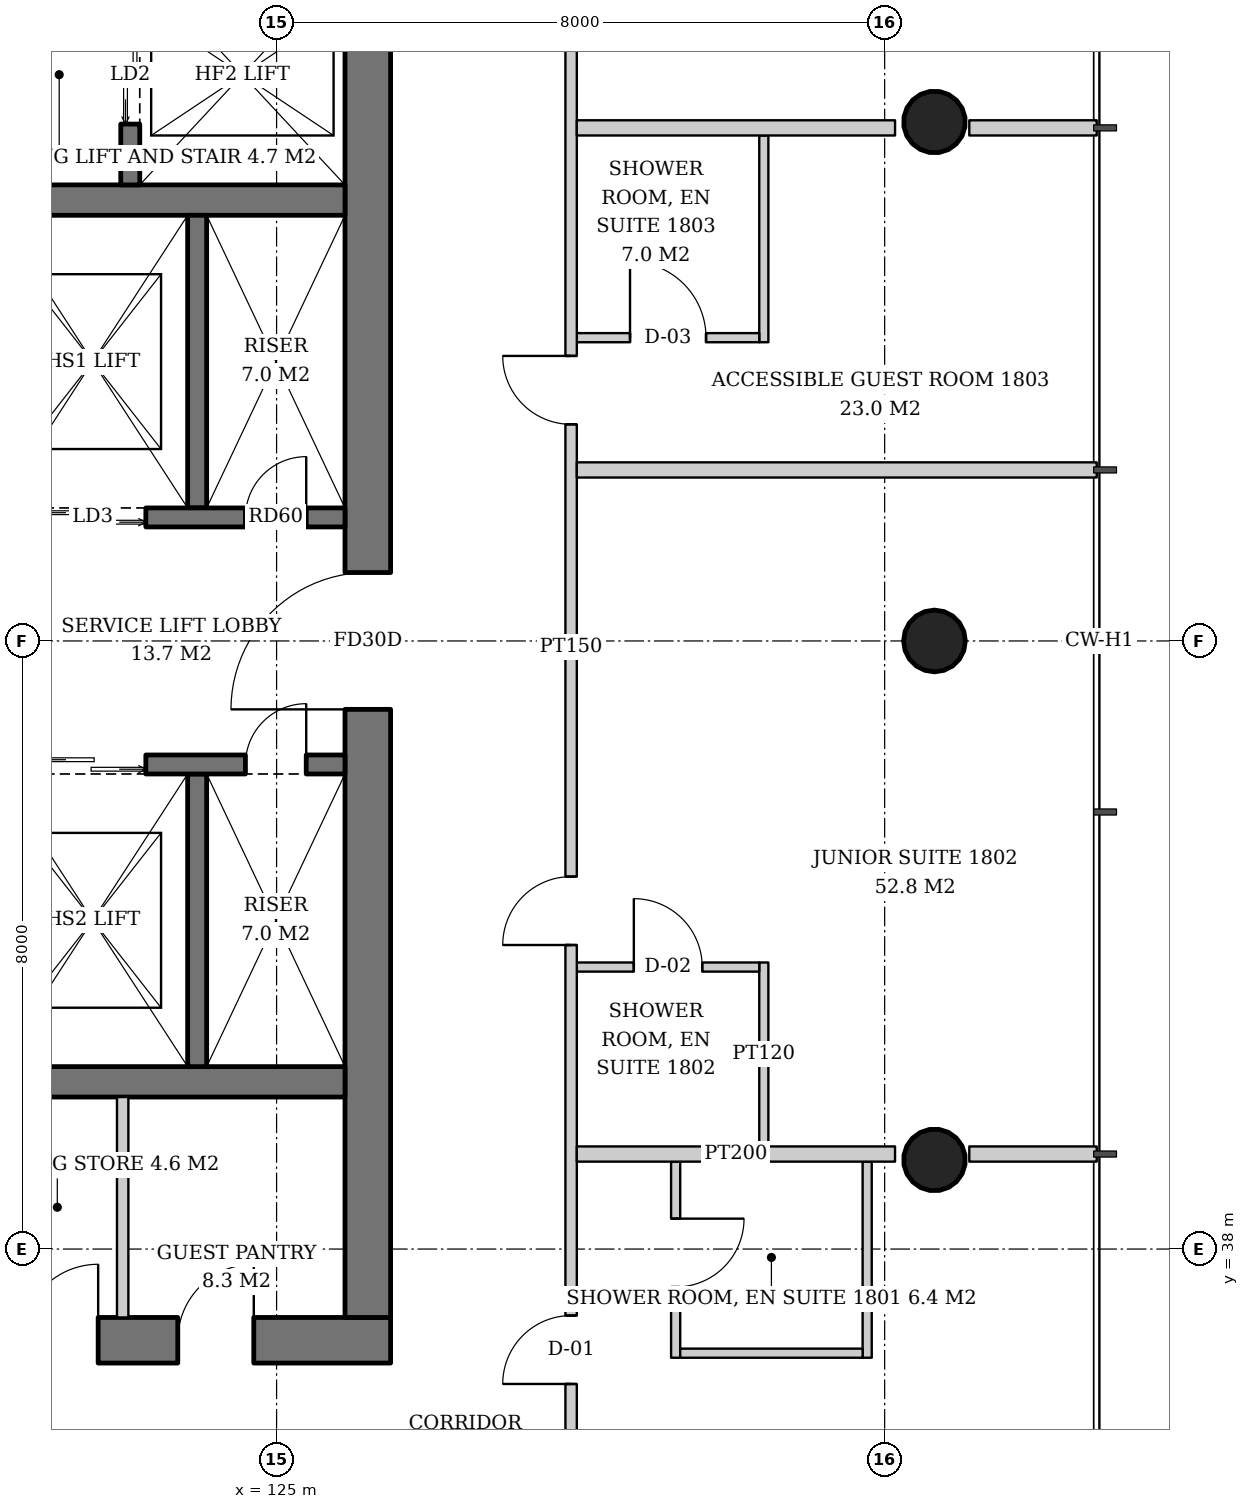
"""IFC4 building model, lengths in metres.
Left out: names, types, materials, properties, quantities, classifications, styles, units other than length and angle.
Written with IfcOpenShell. Run it as: python <this file> out.ifc"""

import sys

from ifc_helpers import new_model, si_unit, direction, frame, frame_2d, origin, origin_2d, place, context, subcontext, project, spatial, rectangle, hollow_circle, extrude, element, fill, save


model = new_model("IFC4")
c1 = context("Model", 3, precision=1e-05, world=origin(), true_north=direction((0.0, 1.0)))
c2 = subcontext(c1, "Body", "Model", "MODEL_VIEW")
j1 = project(units=[si_unit("LENGTHUNIT", "METRE"), si_unit("PLANEANGLEUNIT", "RADIAN")], contexts=[c1])
p1 = place(None, origin())
s1 = spatial("IfcSite", under=j1, at=p1, CompositionType="ELEMENT")
p2 = place(p1, origin())
s2 = spatial("IfcBuilding", under=s1, at=p2, CompositionType="ELEMENT")
p3 = place(p2, frame((0.0, 0.0, 74.2)))
s3 = spatial("IfcBuildingStorey", under=s2, at=p3, CompositionType="ELEMENT", Elevation=74.2)
p4 = place(p3, frame((133.707, 39.146, 0.0), z_axis=(-0.042995471882, 0.021561908287, 0.998842566929), x_axis=(-0.448280611873, -0.89389288677, 0.0)))
e1 = element("IfcColumn", 1, at=p4, inside=s3, PredefinedType="COLUMN", context=c2, shape_type="SweptSolid", body=[
    extrude(hollow_circle(Radius=0.406, WallThickness=0.03, at=origin_2d()), origin(), (0.0, 0.0, 1.0), 3.804),
])
p5 = place(p3, frame((133.707, 46.0, 0.0), z_axis=(-0.043005470007, 0.0, 0.999074836811), x_axis=(0.0, -1.0, 0.0)))
e2 = element("IfcColumn", 2, at=p5, inside=s3, PredefinedType="COLUMN", context=c2, shape_type="SweptSolid", body=[
    extrude(hollow_circle(Radius=0.406, WallThickness=0.03, at=origin_2d()), origin(), (0.0, 0.0, 1.0), 3.803),
])
p6 = place(p3, frame((133.707, 52.854, 0.0), z_axis=(-0.042995471882, -0.021561908287, 0.998842566929), x_axis=(0.448280611873, -0.89389288677, 0.0)))
e3 = element("IfcColumn", 3, at=p6, inside=s3, PredefinedType="COLUMN", context=c2, shape_type="SweptSolid", body=[
    extrude(hollow_circle(Radius=0.406, WallThickness=0.03, at=origin_2d()), origin(), (0.0, 0.0, 1.0), 3.804),
])
p7 = place(p3, frame((107.5, 36.8, 0.0), z_axis=(0.0, 0.0, 1.0), x_axis=(1.0, 0.0, 0.0)))
e4 = element("IfcWall", 4, at=p7, inside=s3, PredefinedType="SHEAR", context=c2, shape_type="SweptSolid", body=[
    extrude(rectangle(XDim=19.0, YDim=0.6, at=frame_2d((9.5, 0.0))), origin(), (0.0, 0.0, 1.0), 3.8),
])
p8 = place(p7, frame((3.9, 0.0, 0.0)))
e5 = element("IfcOpeningElement", 5, at=p8, cuts=e4, PredefinedType="OPENING", context=c2, shape_type="SweptSolid", body=[
    extrude(rectangle(XDim=1.0, YDim=2.1, at=frame_2d((0.5, 1.05))), frame((0.0, 0.31, 0.0), z_axis=(0.0, -1.0, 0.0), x_axis=(1.0, 0.0, 0.0)), (0.0, 0.0, 1.0), 0.62),
])
p9 = place(p7, frame((14.153, 0.0, 0.0)))
e6 = element("IfcOpeningElement", 6, at=p9, cuts=e4, PredefinedType="OPENING", context=c2, shape_type="SweptSolid", body=[
    extrude(rectangle(XDim=1.0, YDim=2.1, at=frame_2d((0.5, 1.05))), frame((0.0, 0.31, 0.0), z_axis=(0.0, -1.0, 0.0), x_axis=(1.0, 0.0, 0.0)), (0.0, 0.0, 1.0), 0.62),
])
p10 = place(p7, frame((16.2, 0.0, 0.0)))
e7 = element("IfcOpeningElement", 7, at=p10, cuts=e4, PredefinedType="OPENING", context=c2, shape_type="SweptSolid", body=[
    extrude(rectangle(XDim=1.0, YDim=2.1, at=frame_2d((0.5, 1.05))), frame((0.0, 0.31, 0.0), z_axis=(0.0, -1.0, 0.0), x_axis=(1.0, 0.0, 0.0)), (0.0, 0.0, 1.0), 0.62),
])
p11 = place(p3, frame((126.2, 37.1, 0.0), z_axis=(0.0, 0.0, 1.0), x_axis=(0.0, 1.0, 0.0)))
e8 = element("IfcWall", 8, at=p11, inside=s3, PredefinedType="SHEAR", context=c2, shape_type="SweptSolid", body=[
    extrude(rectangle(XDim=17.8, YDim=0.6, at=frame_2d((8.9, 0.0))), origin(), (0.0, 0.0, 1.0), 3.8),
])
p12 = place(p11, frame((8.0, 0.0, 0.0)))
e9 = element("IfcOpeningElement", 9, at=p12, cuts=e8, PredefinedType="OPENING", context=c2, shape_type="SweptSolid", body=[
    extrude(rectangle(XDim=1.8, YDim=2.4, at=frame_2d((0.9, 1.2))), frame((0.0, 0.31, 0.0), z_axis=(0.0, -1.0, 0.0), x_axis=(1.0, 0.0, 0.0)), (0.0, 0.0, 1.0), 0.62),
])
for number, where, z_axis, x_axis in (
    (10, (108.1, 40.2, 0.0), (0.0, 0.0, 1.0), (1.0, 0.0, 0.0)),
    (11, (108.1, 51.8, 0.0), (0.0, 0.0, 1.0), (1.0, 0.0, 0.0)),
):
    element("IfcWall", number, at=place(p3, frame(where, z_axis=z_axis, x_axis=x_axis)), inside=s3, PredefinedType="SHEAR", context=c2, shape_type="SweptSolid", body=[
        extrude(rectangle(XDim=17.8, YDim=0.4, at=frame_2d((8.9, 0.0))), origin(), (0.0, 0.0, 1.0), 3.8),
    ])
p13 = place(p3, frame((123.075, 52.0, 0.0), z_axis=(0.0, 0.0, 1.0), x_axis=(0.0, 1.0, 0.0)))
e12 = element("IfcWall", 12, at=p13, inside=s3, PredefinedType="SHEAR", context=c2, shape_type="SweptSolid", body=[
    extrude(rectangle(XDim=2.9, YDim=0.25, at=frame_2d((1.45, 0.0))), origin(), (0.0, 0.0, 1.0), 3.8),
])
p14 = place(p13, frame((0.8, 0.0, 0.0)))
e13 = element("IfcOpeningElement", 13, at=p14, cuts=e12, PredefinedType="OPENING", context=c2, shape_type="SweptSolid", body=[
    extrude(rectangle(XDim=1.3, YDim=2.2, at=frame_2d((0.65, 1.1))), frame((0.0, 0.135, 0.0), z_axis=(0.0, -1.0, 0.0), x_axis=(1.0, 0.0, 0.0)), (0.0, 0.0, 1.0), 0.27),
])
p15 = place(p3, frame((123.955, 47.75, 0.0), z_axis=(0.0, 0.0, 1.0), x_axis=(0.0, 1.0, 0.0)))
e14 = element("IfcWall", 14, at=p15, inside=s3, PredefinedType="SHEAR", context=c2, shape_type="SweptSolid", body=[
    extrude(rectangle(XDim=3.85, YDim=0.25, at=frame_2d((1.925, 0.0))), origin(), (0.0, 0.0, 1.0), 3.8),
])
p16 = place(p3, frame((121.33, 47.625, 0.0), z_axis=(0.0, 0.0, 1.0), x_axis=(1.0, 0.0, 0.0)))
e15 = element("IfcWall", 15, at=p16, inside=s3, PredefinedType="SHEAR", context=c2, shape_type="SweptSolid", body=[
    extrude(rectangle(XDim=4.57, YDim=0.25, at=frame_2d((2.285, 0.0))), origin(), (0.0, 0.0, 1.0), 3.8),
])
p17 = place(p16, frame((0.55, 0.0, 0.0)))
e16 = element("IfcOpeningElement", 16, at=p17, cuts=e15, PredefinedType="OPENING", context=c2, shape_type="SweptSolid", body=[
    extrude(rectangle(XDim=1.4, YDim=2.4, at=frame_2d((0.7, 1.2))), frame((0.0, 0.135, 0.0), z_axis=(0.0, -1.0, 0.0), x_axis=(1.0, 0.0, 0.0)), (0.0, 0.0, 1.0), 0.27),
])
p18 = place(p16, frame((3.26, 0.0, 0.0)))
e17 = element("IfcOpeningElement", 17, at=p18, cuts=e15, PredefinedType="OPENING", context=c2, shape_type="SweptSolid", body=[
    extrude(rectangle(XDim=0.8, YDim=2.0, at=frame_2d((0.4, 1.0))), frame((0.0, 0.135, 0.0), z_axis=(0.0, -1.0, 0.0), x_axis=(1.0, 0.0, 0.0)), (0.0, 0.0, 1.0), 0.27),
])
p19 = place(p3, frame((123.955, 44.25, 0.0), z_axis=(0.0, 0.0, 1.0), x_axis=(0.0, -1.0, 0.0)))
e18 = element("IfcWall", 18, at=p19, inside=s3, PredefinedType="SHEAR", context=c2, shape_type="SweptSolid", body=[
    extrude(rectangle(XDim=3.85, YDim=0.25, at=frame_2d((1.925, 0.0))), origin(), (0.0, 0.0, 1.0), 3.8),
])
p20 = place(p3, frame((121.33, 44.375, 0.0), z_axis=(0.0, 0.0, 1.0), x_axis=(1.0, 0.0, 0.0)))
e19 = element("IfcWall", 19, at=p20, inside=s3, PredefinedType="SHEAR", context=c2, shape_type="SweptSolid", body=[
    extrude(rectangle(XDim=4.57, YDim=0.25, at=frame_2d((2.285, 0.0))), origin(), (0.0, 0.0, 1.0), 3.8),
])
p21 = place(p20, frame((0.55, 0.0, 0.0)))
e20 = element("IfcOpeningElement", 20, at=p21, cuts=e19, PredefinedType="OPENING", context=c2, shape_type="SweptSolid", body=[
    extrude(rectangle(XDim=1.4, YDim=2.4, at=frame_2d((0.7, 1.2))), frame((0.0, 0.135, 0.0), z_axis=(0.0, -1.0, 0.0), x_axis=(1.0, 0.0, 0.0)), (0.0, 0.0, 1.0), 0.27),
])
p22 = place(p20, frame((3.26, 0.0, 0.0)))
e21 = element("IfcOpeningElement", 21, at=p22, cuts=e19, PredefinedType="OPENING", context=c2, shape_type="SweptSolid", body=[
    extrude(rectangle(XDim=0.8, YDim=2.0, at=frame_2d((0.4, 1.0))), frame((0.0, 0.135, 0.0), z_axis=(0.0, -1.0, 0.0), x_axis=(1.0, 0.0, 0.0)), (0.0, 0.0, 1.0), 0.27),
])
p23 = place(p3, frame((122.975, 37.1, 0.0), z_axis=(0.0, 0.0, 1.0), x_axis=(0.0, 1.0, 0.0)))
e22 = element("IfcWall", 22, at=p23, inside=s3, PredefinedType="SOLIDWALL", context=c2, shape_type="SweptSolid", body=[
    extrude(rectangle(XDim=2.9, YDim=0.15, at=frame_2d((1.45, 0.0))), origin(), (0.0, 0.0, 1.0), 3.6),
])
p24 = place(p3, frame((130.25, 39.15, 0.0), z_axis=(0.0, 0.0, 1.0), x_axis=(0.0, -1.0, 0.0)))
e23 = element("IfcWall", 23, at=p24, inside=s3, PredefinedType="PARTITIONING", context=c2, shape_type="SweptSolid", body=[
    extrude(rectangle(XDim=2.58, YDim=0.12, at=frame_2d((1.29, 0.0))), origin(), (0.0, 0.0, 1.0), 2.8),
])
p25 = place(p24, frame((0.75, 0.0, 0.0)))
e24 = element("IfcOpeningElement", 24, at=p25, cuts=e23, PredefinedType="OPENING", context=c2, shape_type="SweptSolid", body=[
    extrude(rectangle(XDim=0.9, YDim=2.1, at=frame_2d((0.45, 1.05))), frame((0.0, 0.07, 0.0), z_axis=(0.0, -1.0, 0.0), x_axis=(1.0, 0.0, 0.0)), (0.0, 0.0, 1.0), 0.14),
])
p26 = place(p3, frame((132.77, 39.15, 0.0), z_axis=(0.0, 0.0, 1.0), x_axis=(0.0, -1.0, 0.0)))
e25 = element("IfcWall", 25, at=p26, inside=s3, PredefinedType="PARTITIONING", context=c2, shape_type="SweptSolid", body=[
    extrude(rectangle(XDim=2.58, YDim=0.12, at=frame_2d((1.29, 0.0))), origin(), (0.0, 0.0, 1.0), 2.8),
])
p27 = place(p3, frame((130.31, 36.63, 0.0), z_axis=(0.0, 0.0, 1.0), x_axis=(1.0, 0.0, 0.0)))
e26 = element("IfcWall", 26, at=p27, inside=s3, PredefinedType="PARTITIONING", context=c2, shape_type="SweptSolid", body=[
    extrude(rectangle(XDim=2.4, YDim=0.12, at=frame_2d((1.2, 0.0))), origin(), (0.0, 0.0, 1.0), 2.8),
])
p28 = place(p3, frame((131.41, 39.35, 0.0), z_axis=(0.0, 0.0, 1.0), x_axis=(0.0, 1.0, 0.0)))
e27 = element("IfcWall", 27, at=p28, inside=s3, PredefinedType="PARTITIONING", context=c2, shape_type="SweptSolid", body=[
    extrude(rectangle(XDim=2.42, YDim=0.12, at=frame_2d((1.21, 0.0))), origin(), (0.0, 0.0, 1.0), 2.847),
])
p29 = place(p3, frame((128.95, 41.71, 0.0), z_axis=(0.0, 0.0, 1.0), x_axis=(1.0, 0.0, 0.0)))
e28 = element("IfcWall", 28, at=p29, inside=s3, PredefinedType="PARTITIONING", context=c2, shape_type="SweptSolid", body=[
    extrude(rectangle(XDim=2.4, YDim=0.12, at=frame_2d((1.2, 0.0))), origin(), (0.0, 0.0, 1.0), 3.6),
])
p30 = place(p29, frame((0.75, 0.0, 0.0)))
e29 = element("IfcOpeningElement", 29, at=p30, cuts=e28, PredefinedType="OPENING", context=c2, shape_type="SweptSolid", body=[
    extrude(rectangle(XDim=0.9, YDim=2.1, at=frame_2d((0.45, 1.05))), frame((0.0, 0.07, 0.0), z_axis=(0.0, -1.0, 0.0), x_axis=(1.0, 0.0, 0.0)), (0.0, 0.0, 1.0), 0.14),
])
p31 = place(p3, frame((131.41, 49.93, 0.0), z_axis=(0.0, 0.0, 1.0), x_axis=(0.0, 1.0, 0.0)))
e30 = element("IfcWall", 30, at=p31, inside=s3, PredefinedType="PARTITIONING", context=c2, shape_type="SweptSolid", body=[
    extrude(rectangle(XDim=2.72, YDim=0.12, at=frame_2d((1.36, 0.0))), origin(), (0.0, 0.0, 1.0), 3.6),
])
p32 = place(p3, frame((128.95, 49.99, 0.0), z_axis=(0.0, 0.0, 1.0), x_axis=(1.0, 0.0, 0.0)))
e31 = element("IfcWall", 31, at=p32, inside=s3, PredefinedType="PARTITIONING", context=c2, shape_type="SweptSolid", body=[
    extrude(rectangle(XDim=2.4, YDim=0.12, at=frame_2d((1.2, 0.0))), origin(), (0.0, 0.0, 1.0), 3.6),
])
p33 = place(p32, frame((0.7, 0.0, 0.0)))
e32 = element("IfcOpeningElement", 32, at=p33, cuts=e31, PredefinedType="OPENING", context=c2, shape_type="SweptSolid", body=[
    extrude(rectangle(XDim=1.0, YDim=2.1, at=frame_2d((0.5, 1.05))), frame((0.0, 0.07, 0.0), z_axis=(0.0, -1.0, 0.0), x_axis=(1.0, 0.0, 0.0)), (0.0, 0.0, 1.0), 0.14),
])
p34 = place(p3, frame((128.875, 34.05, 0.0), z_axis=(0.0, 0.0, 1.0), x_axis=(0.0, 1.0, 0.0)))
e33 = element("IfcWall", 33, at=p34, inside=s3, PredefinedType="PARTITIONING", context=c2, shape_type="SweptSolid", body=[
    extrude(rectangle(XDim=23.75, YDim=0.15, at=frame_2d((11.875, 0.0))), origin(), (0.0, 0.0, 1.0), 2.8),
])
p35 = place(p34, frame((2.175, 0.0, 0.0)))
e34 = element("IfcOpeningElement", 34, at=p35, cuts=e33, PredefinedType="OPENING", context=c2, shape_type="SweptSolid", body=[
    extrude(rectangle(XDim=0.9, YDim=2.1, at=frame_2d((0.45, 1.05))), frame((0.0, 0.085, 0.0), z_axis=(0.0, -1.0, 0.0), x_axis=(1.0, 0.0, 0.0)), (0.0, 0.0, 1.0), 0.17),
])
p36 = place(p34, frame((7.95, 0.0, 0.0)))
e35 = element("IfcOpeningElement", 35, at=p36, cuts=e33, PredefinedType="OPENING", context=c2, shape_type="SweptSolid", body=[
    extrude(rectangle(XDim=0.9, YDim=2.1, at=frame_2d((0.45, 1.05))), frame((0.0, 0.085, 0.0), z_axis=(0.0, -1.0, 0.0), x_axis=(1.0, 0.0, 0.0)), (0.0, 0.0, 1.0), 0.17),
])
p37 = place(p34, frame((14.8, 0.0, 0.0)))
e36 = element("IfcOpeningElement", 36, at=p37, cuts=e33, PredefinedType="OPENING", context=c2, shape_type="SweptSolid", body=[
    extrude(rectangle(XDim=0.9, YDim=2.1, at=frame_2d((0.45, 1.05))), frame((0.0, 0.085, 0.0), z_axis=(0.0, -1.0, 0.0), x_axis=(1.0, 0.0, 0.0)), (0.0, 0.0, 1.0), 0.17),
])
p38 = place(p3, frame((128.95, 39.25, 0.0), z_axis=(0.0, 0.0, 1.0), x_axis=(1.0, 0.0, 0.0)))
e37 = element("IfcWall", 37, at=p38, inside=s3, PredefinedType="PARTITIONING", context=c2, shape_type="SweptSolid", body=[
    extrude(rectangle(XDim=4.187, YDim=0.2, at=frame_2d((2.093, 0.0))), origin(), (0.0, 0.0, 1.0), 3.6),
])
p39 = place(p3, frame((134.113, 39.25, 0.0), z_axis=(0.0, 0.0, 1.0), x_axis=(1.0, 0.0, 0.0)))
e38 = element("IfcWall", 38, at=p39, inside=s3, PredefinedType="PARTITIONING", context=c2, shape_type="SweptSolid", body=[
    extrude(rectangle(XDim=1.677, YDim=0.2, at=frame_2d((0.838, 0.0))), origin(), (0.0, 0.0, 1.0), 3.6),
])
p40 = place(p3, frame((128.95, 48.25, 0.0), z_axis=(0.0, 0.0, 1.0), x_axis=(1.0, 0.0, 0.0)))
e39 = element("IfcWall", 39, at=p40, inside=s3, PredefinedType="PARTITIONING", context=c2, shape_type="SweptSolid", body=[
    extrude(rectangle(XDim=6.84, YDim=0.2, at=frame_2d((3.42, 0.0))), origin(), (0.0, 0.0, 1.0), 3.05),
])
p41 = place(p3, frame((128.95, 52.75, 0.0), z_axis=(0.0, 0.0, 1.0), x_axis=(1.0, 0.0, 0.0)))
e40 = element("IfcWall", 40, at=p41, inside=s3, PredefinedType="PARTITIONING", context=c2, shape_type="SweptSolid", body=[
    extrude(rectangle(XDim=4.187, YDim=0.2, at=frame_2d((2.093, 0.0))), origin(), (0.0, 0.0, 1.0), 3.6),
])
p42 = place(p3, frame((134.113, 52.75, 0.0), z_axis=(0.0, 0.0, 1.0), x_axis=(1.0, 0.0, 0.0)))
e41 = element("IfcWall", 41, at=p42, inside=s3, PredefinedType="PARTITIONING", context=c2, shape_type="SweptSolid", body=[
    extrude(rectangle(XDim=1.677, YDim=0.2, at=frame_2d((0.838, 0.0))), origin(), (0.0, 0.0, 1.0), 3.6),
])
p43 = place(p14, origin())
e42 = element("IfcDoor", 42, at=p43, inside=s3, OperationType="DOUBLE_DOOR_SLIDING", PredefinedType="DOOR", context=c2, shape_type="SweptSolid", body=[
    extrude(rectangle(XDim=1.3, YDim=2.2, at=frame_2d((0.65, 1.1))), frame((0.0, 0.025, 0.0), z_axis=(0.0, -1.0, 0.0), x_axis=(1.0, 0.0, 0.0)), (0.0, 0.0, 1.0), 0.05),
])
fill(e13, e42)
p44 = place(p17, origin())
e43 = element("IfcDoor", 43, at=p44, inside=s3, OperationType="DOUBLE_DOOR_SLIDING", PredefinedType="DOOR", context=c2, shape_type="SweptSolid", body=[
    extrude(rectangle(XDim=1.4, YDim=2.4, at=frame_2d((0.7, 1.2))), frame((0.0, 0.025, 0.0), z_axis=(0.0, -1.0, 0.0), x_axis=(1.0, 0.0, 0.0)), (0.0, 0.0, 1.0), 0.05),
])
fill(e16, e43)
p45 = place(p18, origin())
e44 = element("IfcDoor", 44, at=p45, inside=s3, OperationType="SINGLE_SWING_RIGHT", PredefinedType="DOOR", context=c2, shape_type="SweptSolid", body=[
    extrude(rectangle(XDim=0.8, YDim=2.0, at=frame_2d((0.4, 1.0))), frame((0.0, 0.025, 0.0), z_axis=(0.0, -1.0, 0.0), x_axis=(1.0, 0.0, 0.0)), (0.0, 0.0, 1.0), 0.05),
])
fill(e17, e44)
p46 = place(p21, origin())
e45 = element("IfcDoor", 45, at=p46, inside=s3, OperationType="DOUBLE_DOOR_SLIDING", PredefinedType="DOOR", context=c2, shape_type="SweptSolid", body=[
    extrude(rectangle(XDim=1.4, YDim=2.4, at=frame_2d((0.7, 1.2))), frame((0.0, 0.025, 0.0), z_axis=(0.0, -1.0, 0.0), x_axis=(1.0, 0.0, 0.0)), (0.0, 0.0, 1.0), 0.05),
])
fill(e20, e45)
p47 = place(p22, origin())
e46 = element("IfcDoor", 46, at=p47, inside=s3, OperationType="SINGLE_SWING_RIGHT", PredefinedType="DOOR", context=c2, shape_type="SweptSolid", body=[
    extrude(rectangle(XDim=0.8, YDim=2.0, at=frame_2d((0.4, 1.0))), frame((0.0, 0.025, 0.0), z_axis=(0.0, -1.0, 0.0), x_axis=(1.0, 0.0, 0.0)), (0.0, 0.0, 1.0), 0.05),
])
fill(e21, e46)
p48 = place(p12, origin())
e47 = element("IfcDoor", 47, at=p48, inside=s3, OperationType="DOUBLE_DOOR_SINGLE_SWING", PredefinedType="DOOR", context=c2, shape_type="SweptSolid", body=[
    extrude(rectangle(XDim=1.8, YDim=2.4, at=frame_2d((0.9, 1.2))), frame((0.0, 0.025, 0.0), z_axis=(0.0, -1.0, 0.0), x_axis=(1.0, 0.0, 0.0)), (0.0, 0.0, 1.0), 0.05),
])
fill(e9, e47)
p49 = place(p9, origin())
e48 = element("IfcDoor", 48, at=p49, inside=s3, OperationType="SINGLE_SWING_RIGHT", PredefinedType="DOOR", context=c2, shape_type="SweptSolid", body=[
    extrude(rectangle(XDim=1.0, YDim=2.1, at=frame_2d((0.5, 1.05))), frame((0.0, 0.29, 0.0), z_axis=(0.0, -1.0, 0.0), x_axis=(1.0, 0.0, 0.0)), (0.0, 0.0, 1.0), 0.05),
])
fill(e6, e48)
p50 = place(p10, origin())
e49 = element("IfcDoor", 49, at=p50, inside=s3, OperationType="SINGLE_SWING_RIGHT", PredefinedType="DOOR", context=c2, shape_type="SweptSolid", body=[
    extrude(rectangle(XDim=1.0, YDim=2.1, at=frame_2d((0.5, 1.05))), frame((0.0, 0.29, 0.0), z_axis=(0.0, -1.0, 0.0), x_axis=(1.0, 0.0, 0.0)), (0.0, 0.0, 1.0), 0.05),
])
fill(e7, e49)
p51 = place(p25, origin())
e50 = element("IfcDoor", 50, at=p51, inside=s3, OperationType="SINGLE_SWING_LEFT", PredefinedType="DOOR", context=c2, shape_type="SweptSolid", body=[
    extrude(rectangle(XDim=0.9, YDim=2.1, at=frame_2d((0.45, 1.05))), frame((0.0, 0.025, 0.0), z_axis=(0.0, -1.0, 0.0), x_axis=(1.0, 0.0, 0.0)), (0.0, 0.0, 1.0), 0.05),
])
fill(e24, e50)
p52 = place(p30, origin())
e51 = element("IfcDoor", 51, at=p52, inside=s3, OperationType="SINGLE_SWING_LEFT", PredefinedType="DOOR", context=c2, shape_type="SweptSolid", body=[
    extrude(rectangle(XDim=0.9, YDim=2.1, at=frame_2d((0.45, 1.05))), frame((0.0, 0.025, 0.0), z_axis=(0.0, -1.0, 0.0), x_axis=(1.0, 0.0, 0.0)), (0.0, 0.0, 1.0), 0.05),
])
fill(e29, e51)
p53 = place(p33, origin())
e52 = element("IfcDoor", 52, at=p53, inside=s3, OperationType="SINGLE_SWING_LEFT", PredefinedType="DOOR", context=c2, shape_type="SweptSolid", body=[
    extrude(rectangle(XDim=1.0, YDim=2.1, at=frame_2d((0.5, 1.05))), frame((0.0, 0.025, 0.0), z_axis=(0.0, -1.0, 0.0), x_axis=(1.0, 0.0, 0.0)), (0.0, 0.0, 1.0), 0.05),
])
fill(e32, e52)
p54 = place(p35, origin())
e53 = element("IfcDoor", 53, at=p54, inside=s3, OperationType="SINGLE_SWING_LEFT", PredefinedType="DOOR", context=c2, shape_type="SweptSolid", body=[
    extrude(rectangle(XDim=0.9, YDim=2.1, at=frame_2d((0.45, 1.05))), frame((0.0, 0.025, 0.0), z_axis=(0.0, -1.0, 0.0), x_axis=(1.0, 0.0, 0.0)), (0.0, 0.0, 1.0), 0.05),
])
fill(e34, e53)
p55 = place(p36, origin())
e54 = element("IfcDoor", 54, at=p55, inside=s3, OperationType="SINGLE_SWING_LEFT", PredefinedType="DOOR", context=c2, shape_type="SweptSolid", body=[
    extrude(rectangle(XDim=0.9, YDim=2.1, at=frame_2d((0.45, 1.05))), frame((0.0, 0.025, 0.0), z_axis=(0.0, -1.0, 0.0), x_axis=(1.0, 0.0, 0.0)), (0.0, 0.0, 1.0), 0.05),
])
fill(e35, e54)
p56 = place(p37, origin())
e55 = element("IfcDoor", 55, at=p56, inside=s3, OperationType="SINGLE_SWING_RIGHT", PredefinedType="DOOR", context=c2, shape_type="SweptSolid", body=[
    extrude(rectangle(XDim=0.9, YDim=2.1, at=frame_2d((0.45, 1.05))), frame((0.0, 0.025, 0.0), z_axis=(0.0, -1.0, 0.0), x_axis=(1.0, 0.0, 0.0)), (0.0, 0.0, 1.0), 0.05),
])
fill(e36, e55)
save(model, sys.argv[1])
